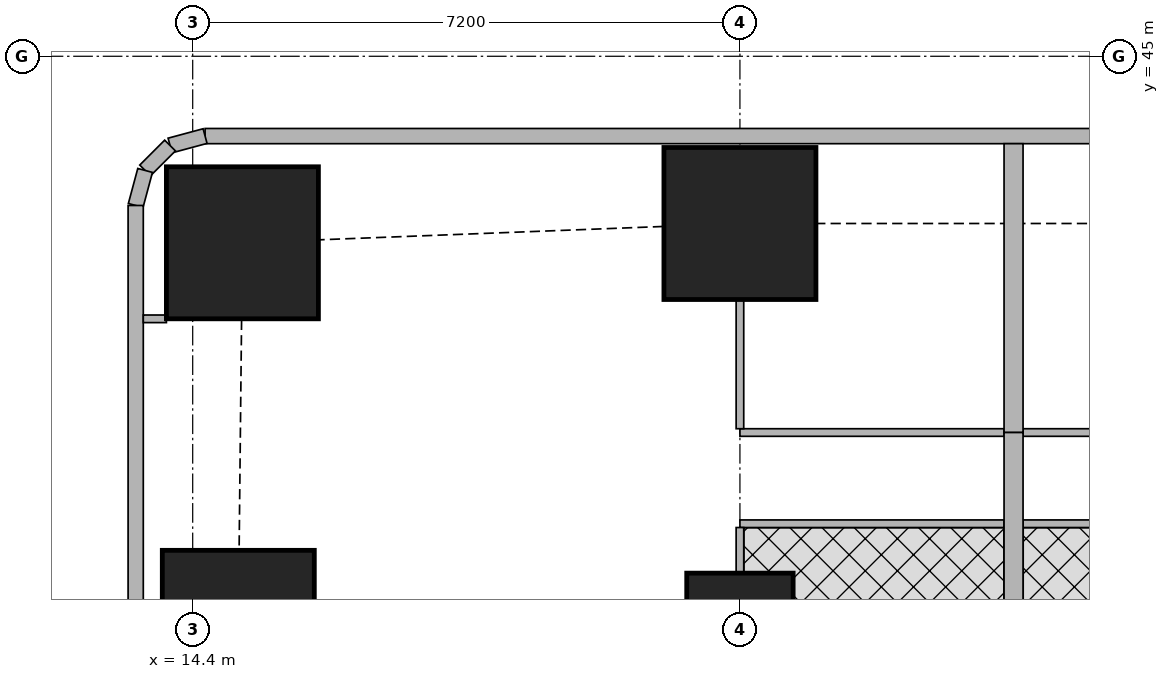
"""IFC4 building model, lengths in metres.
Left out: names, types, materials, properties, quantities, classifications, styles, units other than length and angle.
Written with IfcOpenShell. Run it as: python <this file> out.ifc"""

import sys

from ifc_helpers import new_model, si_unit, direction, frame, frame_2d, origin, origin_2d, place, context, subcontext, project, spatial, rectangle, extrude, element, fill, save


model = new_model("IFC4")
c1 = context("Model", 3, precision=1e-05, world=origin(), true_north=direction((0.0, 1.0)))
c2 = subcontext(c1, "Body", "Model", "MODEL_VIEW")
j1 = project(units=[si_unit("LENGTHUNIT", "METRE"), si_unit("PLANEANGLEUNIT", "RADIAN")], contexts=[c1])
p1 = place(None, origin())
s1 = spatial("IfcSite", under=j1, at=p1, CompositionType="ELEMENT")
p2 = place(p1, origin())
s2 = spatial("IfcBuilding", under=s1, at=p2, CompositionType="ELEMENT")
p3 = place(p2, frame((0.0, 0.0, 251.6)))
s3 = spatial("IfcBuildingStorey", under=s2, at=p3, CompositionType="ELEMENT", Elevation=251.6)
p4 = place(p3, frame((15.0, 37.5, 0.0), z_axis=(0.0, 0.0, 1.0), x_axis=(1.0, 0.0, 0.0)))
e1 = element("IfcColumn", 1, at=p4, inside=s3, PredefinedType="COLUMN", context=c2, shape_type="SweptSolid", body=[
    extrude(rectangle(XDim=2.0, YDim=2.0, at=origin_2d()), origin(), (0.0, 0.0, 1.0), 3.75),
])
p5 = place(p3, frame((21.6, 37.5, 0.0), z_axis=(0.0, 0.0, 1.0), x_axis=(1.0, 0.0, 0.0)))
e2 = element("IfcColumn", 2, at=p5, inside=s3, PredefinedType="COLUMN", context=c2, shape_type="SweptSolid", body=[
    extrude(rectangle(XDim=1.4, YDim=1.4, at=origin_2d()), origin(), (0.0, 0.0, 1.0), 3.75),
])
for number, where, z_axis, x_axis in (
    (3, (15.054, 42.546, -0.25), (0.0, 0.0, 1.0), (1.0, 0.0, 0.0)),
    (4, (21.6, 42.8, -0.25), (0.0, 0.0, 1.0), (1.0, 0.0, 0.0)),
):
    element("IfcColumn", number, at=place(p3, frame(where, z_axis=z_axis, x_axis=x_axis)), inside=s3, PredefinedType="COLUMN", context=c2, shape_type="SweptSolid", body=[
        extrude(rectangle(XDim=2.0, YDim=2.0, at=origin_2d()), origin(), (0.0, 0.0, 1.0), 4.0),
    ])
p6 = place(p3, frame((42.103, 43.95, 0.0), z_axis=(0.0, 0.0, 1.0), x_axis=(-1.0, 0.0, 0.0)))
e5 = element("IfcWall", 5, at=p6, inside=s3, PredefinedType="SOLIDWALL", context=c2, shape_type="SweptSolid", body=[
    extrude(rectangle(XDim=27.54, YDim=0.2, at=frame_2d((13.77, 0.0))), origin(), (0.0, 0.0, 1.0), 3.5),
])
p7 = place(p6, frame((10.603, 0.0, 0.9)))
e6 = element("IfcOpeningElement", 6, at=p7, cuts=e5, PredefinedType="OPENING", context=c2, shape_type="SweptSolid", body=[
    extrude(rectangle(XDim=1.8, YDim=1.5, at=frame_2d((0.9, 0.75))), frame((0.0, 0.11, 0.0), z_axis=(0.0, -1.0, 0.0), x_axis=(1.0, 0.0, 0.0)), (0.0, 0.0, 1.0), 0.22),
])
p8 = place(p6, frame((14.203, 0.0, 0.9)))
e7 = element("IfcOpeningElement", 7, at=p8, cuts=e5, PredefinedType="OPENING", context=c2, shape_type="SweptSolid", body=[
    extrude(rectangle(XDim=1.8, YDim=1.5, at=frame_2d((0.9, 0.75))), frame((0.0, 0.11, 0.0), z_axis=(0.0, -1.0, 0.0), x_axis=(1.0, 0.0, 0.0)), (0.0, 0.0, 1.0), 0.22),
])
p9 = place(p6, frame((17.803, 0.0, 0.9)))
e8 = element("IfcOpeningElement", 8, at=p9, cuts=e5, PredefinedType="OPENING", context=c2, shape_type="SweptSolid", body=[
    extrude(rectangle(XDim=1.8, YDim=1.5, at=frame_2d((0.9, 0.75))), frame((0.0, 0.11, 0.0), z_axis=(0.0, -1.0, 0.0), x_axis=(1.0, 0.0, 0.0)), (0.0, 0.0, 1.0), 0.22),
])
p10 = place(p6, frame((22.822, 0.0, 0.9)))
e9 = element("IfcOpeningElement", 9, at=p10, cuts=e5, PredefinedType="OPENING", context=c2, shape_type="SweptSolid", body=[
    extrude(rectangle(XDim=2.4, YDim=1.5, at=frame_2d((1.2, 0.75))), frame((0.0, 0.11, 0.0), z_axis=(0.0, -1.0, 0.0), x_axis=(1.0, 0.0, 0.0)), (0.0, 0.0, 1.0), 0.22),
])
p11 = place(p3, frame((14.563, 43.95, 0.0), z_axis=(0.0, 0.0, 1.0), x_axis=(-0.965655254015, -0.259826731483, 0.0)))
e10 = element("IfcWall", 10, at=p11, inside=s3, PredefinedType="SOLIDWALL", context=c2, shape_type="SweptSolid", body=[
    extrude(rectangle(XDim=0.477, YDim=0.2, at=frame_2d((0.239, 0.0))), origin(), (0.0, 0.0, 1.0), 3.5),
])
p12 = place(p3, frame((14.102, 43.826, 0.0), z_axis=(0.0, 0.0, 1.0), x_axis=(-0.707369890659, -0.706843573776, 0.0)))
e11 = element("IfcWall", 11, at=p12, inside=s3, PredefinedType="SOLIDWALL", context=c2, shape_type="SweptSolid", body=[
    extrude(rectangle(XDim=0.464, YDim=0.2, at=frame_2d((0.232, 0.0))), origin(), (0.0, 0.0, 1.0), 3.5),
])
p13 = place(p3, frame((13.774, 43.498, 0.0), z_axis=(0.0, 0.0, 1.0), x_axis=(-0.259826731483, -0.965655254015, 0.0)))
e12 = element("IfcWall", 12, at=p13, inside=s3, PredefinedType="SOLIDWALL", context=c2, shape_type="SweptSolid", body=[
    extrude(rectangle(XDim=0.477, YDim=0.2, at=frame_2d((0.239, 0.0))), origin(), (0.0, 0.0, 1.0), 3.5),
])
p14 = place(p3, frame((13.65, 43.037, 0.0), z_axis=(0.0, 0.0, 1.0), x_axis=(0.0, -1.0, 0.0)))
e13 = element("IfcWall", 13, at=p14, inside=s3, PredefinedType="SOLIDWALL", context=c2, shape_type="SweptSolid", body=[
    extrude(rectangle(XDim=35.374, YDim=0.2, at=frame_2d((17.687, 0.0))), origin(), (0.0, 0.0, 1.0), 3.5),
])
p15 = place(p14, frame((1.959, 0.0, 0.9)))
e14 = element("IfcOpeningElement", 14, at=p15, cuts=e13, PredefinedType="OPENING", context=c2, shape_type="SweptSolid", body=[
    extrude(rectangle(XDim=1.8, YDim=1.5, at=frame_2d((0.9, 0.75))), frame((0.0, 0.11, 0.0), z_axis=(0.0, -1.0, 0.0), x_axis=(1.0, 0.0, 0.0)), (0.0, 0.0, 1.0), 0.22),
])
p16 = place(p3, frame((14.054, 41.546, 0.0), z_axis=(0.0, 0.0, 1.0), x_axis=(-1.0, 0.0, 0.0)))
e15 = element("IfcWall", 15, at=p16, inside=s3, PredefinedType="PARTITIONING", context=c2, shape_type="SweptSolid", body=[
    extrude(rectangle(XDim=0.304, YDim=0.1, at=frame_2d((0.152, 0.0))), origin(), (0.0, 0.0, 1.0), 3.5),
])
p17 = place(p3, frame((21.6, 40.05, 0.0), z_axis=(0.0, 0.0, 1.0), x_axis=(1.0, 0.0, 0.0)))
e16 = element("IfcWall", 16, at=p17, inside=s3, PredefinedType="PARTITIONING", context=c2, shape_type="SweptSolid", body=[
    extrude(rectangle(XDim=3.475, YDim=0.1, at=frame_2d((1.737, 0.0))), origin(), (0.0, 0.0, 1.0), 3.5),
])
p18 = place(p17, frame((0.2, 0.0, 0.0)))
e17 = element("IfcOpeningElement", 17, at=p18, cuts=e16, PredefinedType="OPENING", context=c2, shape_type="SweptSolid", body=[
    extrude(rectangle(XDim=0.9, YDim=2.1, at=frame_2d((0.45, 1.05))), frame((0.0, 0.06, 0.0), z_axis=(0.0, -1.0, 0.0), x_axis=(1.0, 0.0, 0.0)), (0.0, 0.0, 1.0), 0.12),
])
p19 = place(p3, frame((21.6, 38.85, 0.0), z_axis=(0.0, 0.0, 1.0), x_axis=(1.0, 0.0, 0.0)))
e18 = element("IfcWall", 18, at=p19, inside=s3, PredefinedType="PARTITIONING", context=c2, shape_type="SweptSolid", body=[
    extrude(rectangle(XDim=3.475, YDim=0.1, at=frame_2d((1.737, 0.0))), origin(), (0.0, 0.0, 1.0), 3.5),
])
p20 = place(p19, frame((1.35, 0.0, 0.0)))
e19 = element("IfcOpeningElement", 19, at=p20, cuts=e18, PredefinedType="OPENING", context=c2, shape_type="SweptSolid", body=[
    extrude(rectangle(XDim=0.9, YDim=2.1, at=frame_2d((0.45, 1.05))), frame((0.0, 0.06, 0.0), z_axis=(0.0, -1.0, 0.0), x_axis=(1.0, 0.0, 0.0)), (0.0, 0.0, 1.0), 0.12),
])
p21 = place(p3, frame((21.6, 40.1, 0.0), z_axis=(0.0, 0.0, 1.0), x_axis=(0.0, 1.0, 0.0)))
e20 = element("IfcWall", 20, at=p21, inside=s3, PredefinedType="PARTITIONING", context=c2, shape_type="SweptSolid", body=[
    extrude(rectangle(XDim=1.699, YDim=0.1, at=frame_2d((0.85, 0.0))), origin(), (0.0, 0.0, 1.0), 3.5),
])
p22 = place(p3, frame((21.6, 38.201, 0.0), z_axis=(0.0, 0.0, 1.0), x_axis=(0.0, 1.0, 0.0)))
e21 = element("IfcWall", 21, at=p22, inside=s3, PredefinedType="PARTITIONING", context=c2, shape_type="SweptSolid", body=[
    extrude(rectangle(XDim=0.599, YDim=0.1, at=frame_2d((0.3, 0.0))), origin(), (0.0, 0.0, 1.0), 3.5),
])
p23 = place(p3, frame((25.325, 40.05, 0.0), z_axis=(0.0, 0.0, 1.0), x_axis=(1.0, 0.0, 0.0)))
e22 = element("IfcWall", 22, at=p23, inside=s3, PredefinedType="PARTITIONING", context=c2, shape_type="SweptSolid", body=[
    extrude(rectangle(XDim=3.475, YDim=0.1, at=frame_2d((1.738, 0.0))), origin(), (0.0, 0.0, 1.0), 3.5),
])
p24 = place(p23, frame((2.375, 0.0, 0.0)))
e23 = element("IfcOpeningElement", 23, at=p24, cuts=e22, PredefinedType="OPENING", context=c2, shape_type="SweptSolid", body=[
    extrude(rectangle(XDim=0.9, YDim=2.1, at=frame_2d((0.45, 1.05))), frame((0.0, 0.06, 0.0), z_axis=(0.0, -1.0, 0.0), x_axis=(1.0, 0.0, 0.0)), (0.0, 0.0, 1.0), 0.12),
])
p25 = place(p3, frame((25.325, 38.85, 0.0), z_axis=(0.0, 0.0, 1.0), x_axis=(1.0, 0.0, 0.0)))
e24 = element("IfcWall", 24, at=p25, inside=s3, PredefinedType="PARTITIONING", context=c2, shape_type="SweptSolid", body=[
    extrude(rectangle(XDim=3.475, YDim=0.1, at=frame_2d((1.738, 0.0))), origin(), (0.0, 0.0, 1.0), 3.5),
])
p26 = place(p25, frame((1.225, 0.0, 0.0)))
e25 = element("IfcOpeningElement", 25, at=p26, cuts=e24, PredefinedType="OPENING", context=c2, shape_type="SweptSolid", body=[
    extrude(rectangle(XDim=0.9, YDim=2.1, at=frame_2d((0.45, 1.05))), frame((0.0, 0.06, 0.0), z_axis=(0.0, -1.0, 0.0), x_axis=(1.0, 0.0, 0.0)), (0.0, 0.0, 1.0), 0.12),
])
p27 = place(p3, frame((25.2, 40.05, 0.0), z_axis=(0.0, 0.0, 1.0), x_axis=(0.0, 1.0, 0.0)))
e26 = element("IfcWall", 26, at=p27, inside=s3, PredefinedType="SOLIDWALL", context=c2, shape_type="SweptSolid", body=[
    extrude(rectangle(XDim=3.8, YDim=0.25, at=frame_2d((1.9, 0.0))), origin(), (0.0, 0.0, 1.0), 2.05),
])
p28 = place(p3, frame((25.2, 36.825, 0.0), z_axis=(0.0, 0.0, 1.0), x_axis=(0.0, 1.0, 0.0)))
e27 = element("IfcWall", 27, at=p28, inside=s3, PredefinedType="SOLIDWALL", context=c2, shape_type="SweptSolid", body=[
    extrude(rectangle(XDim=3.225, YDim=0.25, at=frame_2d((1.613, 0.0))), origin(), (0.0, 0.0, 1.0), 3.5),
])
p29 = place(p8, origin())
e28 = element("IfcWindow", 28, at=p29, inside=s3, PartitioningType="SINGLE_PANEL", PredefinedType="WINDOW", context=c2, shape_type="SweptSolid", body=[
    extrude(rectangle(XDim=1.8, YDim=1.5, at=frame_2d((0.9, 0.75))), frame((0.0, 0.03, 0.0), z_axis=(0.0, -1.0, 0.0), x_axis=(1.0, 0.0, 0.0)), (0.0, 0.0, 1.0), 0.06),
])
fill(e7, e28)
p30 = place(p9, origin())
e29 = element("IfcWindow", 29, at=p30, inside=s3, PartitioningType="SINGLE_PANEL", PredefinedType="WINDOW", context=c2, shape_type="SweptSolid", body=[
    extrude(rectangle(XDim=1.8, YDim=1.5, at=frame_2d((0.9, 0.75))), frame((0.0, 0.03, 0.0), z_axis=(0.0, -1.0, 0.0), x_axis=(1.0, 0.0, 0.0)), (0.0, 0.0, 1.0), 0.06),
])
fill(e8, e29)
p31 = place(p10, origin())
e30 = element("IfcWindow", 30, at=p31, inside=s3, PartitioningType="SINGLE_PANEL", PredefinedType="WINDOW", context=c2, shape_type="SweptSolid", body=[
    extrude(rectangle(XDim=2.4, YDim=1.5, at=frame_2d((1.2, 0.75))), frame((0.0, 0.03, 0.0), z_axis=(0.0, -1.0, 0.0), x_axis=(1.0, 0.0, 0.0)), (0.0, 0.0, 1.0), 0.06),
])
fill(e9, e30)
p32 = place(p15, origin())
e31 = element("IfcWindow", 31, at=p32, inside=s3, PartitioningType="SINGLE_PANEL", PredefinedType="WINDOW", context=c2, shape_type="SweptSolid", body=[
    extrude(rectangle(XDim=1.8, YDim=1.5, at=frame_2d((0.9, 0.75))), frame((0.0, 0.03, 0.0), z_axis=(0.0, -1.0, 0.0), x_axis=(1.0, 0.0, 0.0)), (0.0, 0.0, 1.0), 0.06),
])
fill(e14, e31)
p33 = place(p18, origin())
e32 = element("IfcDoor", 32, at=p33, inside=s3, OperationType="SINGLE_SWING_LEFT", PredefinedType="DOOR", context=c2, shape_type="SweptSolid", body=[
    extrude(rectangle(XDim=0.9, YDim=2.1, at=frame_2d((0.45, 1.05))), frame((0.0, 0.025, 0.0), z_axis=(0.0, -1.0, 0.0), x_axis=(1.0, 0.0, 0.0)), (0.0, 0.0, 1.0), 0.05),
])
fill(e17, e32)
p34 = place(p20, origin())
e33 = element("IfcDoor", 33, at=p34, inside=s3, OperationType="SINGLE_SWING_LEFT", PredefinedType="DOOR", context=c2, shape_type="SweptSolid", body=[
    extrude(rectangle(XDim=0.9, YDim=2.1, at=frame_2d((0.45, 1.05))), frame((0.0, 0.025, 0.0), z_axis=(0.0, -1.0, 0.0), x_axis=(1.0, 0.0, 0.0)), (0.0, 0.0, 1.0), 0.05),
])
fill(e19, e33)
save(model, sys.argv[1])
